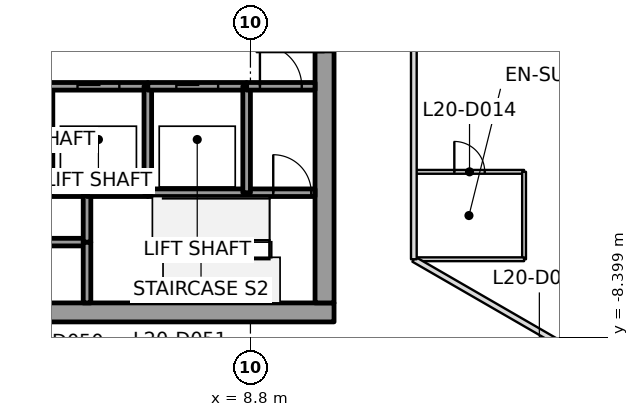
"""IFC4 building model, lengths in metres.
Left out: names, types, materials, properties, quantities, classifications, styles, units other than length and angle.
Written with IfcOpenShell. Run it as: python <this file> out.ifc"""

import sys

from ifc_helpers import new_model, si_unit, direction, frame, frame_2d, origin, place, context, subcontext, project, spatial, rectangle, extrude, element, fill, save


model = new_model("IFC4")
c1 = context("Model", 3, precision=1e-05, world=origin(), true_north=direction((0.0, 1.0)))
c2 = subcontext(c1, "Body", "Model", "MODEL_VIEW")
j1 = project(units=[si_unit("LENGTHUNIT", "METRE"), si_unit("PLANEANGLEUNIT", "RADIAN")], contexts=[c1])
p1 = place(None, origin())
s1 = spatial("IfcSite", under=j1, at=p1, CompositionType="ELEMENT")
p2 = place(p1, origin())
s2 = spatial("IfcBuilding", under=s1, at=p2, CompositionType="ELEMENT")
p3 = place(p2, frame((0.0, 0.0, 96.1)))
s3 = spatial("IfcBuildingStorey", under=s2, at=p3, CompositionType="ELEMENT", Elevation=96.1)
p4 = place(p3, frame((-11.0, -7.75, 0.0), z_axis=(0.0, 0.0, 1.0), x_axis=(1.0, 0.0, 0.0)))
e1 = element("IfcWall", 1, at=p4, inside=s3, PredefinedType="SHEAR", context=c2, shape_type="SweptSolid", body=[
    extrude(rectangle(XDim=22.0, YDim=0.5, at=frame_2d((11.0, 0.0))), origin(), (0.0, 0.0, 1.0), 3.7),
])
p5 = place(p4, frame((10.45, 0.0, 0.0)))
e2 = element("IfcOpeningElement", 2, at=p5, cuts=e1, PredefinedType="OPENING", context=c2, shape_type="SweptSolid", body=[
    extrude(rectangle(XDim=1.1, YDim=2.1, at=frame_2d((0.55, 1.05))), frame((0.0, 0.25, 0.0), z_axis=(0.0, -1.0, 0.0), x_axis=(1.0, 0.0, 0.0)), (0.0, 0.0, 1.0), 0.5),
])
p6 = place(p3, frame((10.75, -7.5, 0.0), z_axis=(0.0, 0.0, 1.0), x_axis=(0.0, 1.0, 0.0)))
e3 = element("IfcWall", 3, at=p6, inside=s3, PredefinedType="SHEAR", context=c2, shape_type="SweptSolid", body=[
    extrude(rectangle(XDim=15.0, YDim=0.5, at=frame_2d((7.5, 0.0))), origin(), (0.0, 0.0, 1.0), 3.7),
])
p7 = place(p6, frame((6.6, 0.0, 0.0)))
e4 = element("IfcOpeningElement", 4, at=p7, cuts=e3, PredefinedType="OPENING", context=c2, shape_type="SweptSolid", body=[
    extrude(rectangle(XDim=1.8, YDim=2.1, at=frame_2d((0.9, 1.05))), frame((0.0, 0.25, 0.0), z_axis=(0.0, -1.0, 0.0), x_axis=(1.0, 0.0, 0.0)), (0.0, 0.0, 1.0), 0.5),
])
p8 = place(p3, frame((4.5, -5.9, 0.0), z_axis=(0.0, 0.0, 1.0), x_axis=(-1.0, 0.0, 0.0)))
e5 = element("IfcWall", 5, at=p8, inside=s3, PredefinedType="SOLIDWALL", context=c2, shape_type="SweptSolid", body=[
    extrude(rectangle(XDim=2.5, YDim=0.2, at=frame_2d((1.25, 0.0))), origin(), (0.0, 0.0, 1.0), 3.55),
])
p9 = place(p3, frame((4.5, -4.6, 0.0), z_axis=(0.0, 0.0, 1.0), x_axis=(-1.0, 0.0, 0.0)))
e6 = element("IfcWall", 6, at=p9, inside=s3, PredefinedType="SOLIDWALL", context=c2, shape_type="SweptSolid", body=[
    extrude(rectangle(XDim=1.0, YDim=0.2, at=frame_2d((0.5, 0.0))), origin(), (0.0, 0.0, 1.0), 3.55),
])
p10 = place(p3, frame((3.5, -1.8, 0.0), z_axis=(0.0, 0.0, 1.0), x_axis=(1.0, 0.0, 0.0)))
e7 = element("IfcWall", 7, at=p10, inside=s3, PredefinedType="SOLIDWALL", context=c2, shape_type="SweptSolid", body=[
    extrude(rectangle(XDim=2.6, YDim=0.2, at=frame_2d((1.3, 0.0))), origin(), (0.0, 0.0, 1.0), 3.55),
])
p11 = place(p10, frame((0.75, 0.0, 0.0)))
e8 = element("IfcOpeningElement", 8, at=p11, cuts=e7, PredefinedType="OPENING", context=c2, shape_type="SweptSolid", body=[
    extrude(rectangle(XDim=1.1, YDim=2.1, at=frame_2d((0.55, 1.05))), frame((0.0, 0.1, 0.0), z_axis=(0.0, -1.0, 0.0), x_axis=(1.0, 0.0, 0.0)), (0.0, 0.0, 1.0), 0.2),
])
p12 = place(p3, frame((4.5, -7.5, 0.0), z_axis=(0.0, 0.0, 1.0), x_axis=(0.0, 1.0, 0.0)))
e9 = element("IfcWall", 9, at=p12, inside=s3, PredefinedType="SOLIDWALL", context=c2, shape_type="SweptSolid", body=[
    extrude(rectangle(XDim=1.6, YDim=0.2, at=frame_2d((0.8, 0.0))), origin(), (0.0, 0.0, 1.0), 3.55),
])
p13 = place(p3, frame((4.5, -5.9, 0.0), z_axis=(0.0, 0.0, 1.0), x_axis=(0.0, 1.0, 0.0)))
e10 = element("IfcWall", 10, at=p13, inside=s3, PredefinedType="SOLIDWALL", context=c2, shape_type="SweptSolid", body=[
    extrude(rectangle(XDim=1.3, YDim=0.2, at=frame_2d((0.65, 0.0))), origin(), (0.0, 0.0, 1.0), 3.55),
])
p14 = place(p3, frame((4.5, -4.6, 0.0), z_axis=(0.0, 0.0, 1.0), x_axis=(1.0, 0.0, 0.0)))
e11 = element("IfcWall", 11, at=p14, inside=s3, PredefinedType="SOLIDWALL", context=c2, shape_type="SweptSolid", body=[
    extrude(rectangle(XDim=1.6, YDim=0.2, at=frame_2d((0.8, 0.0))), origin(), (0.0, 0.0, 1.0), 3.55),
])
p15 = place(p3, frame((6.1, -4.6, 0.0), z_axis=(0.0, 0.0, 1.0), x_axis=(1.0, 0.0, 0.0)))
e12 = element("IfcWall", 12, at=p15, inside=s3, PredefinedType="SOLIDWALL", context=c2, shape_type="SweptSolid", body=[
    extrude(rectangle(XDim=2.6, YDim=0.2, at=frame_2d((1.3, 0.0))), origin(), (0.0, 0.0, 1.0), 3.55),
])
p16 = place(p3, frame((6.1, -4.6, 0.0), z_axis=(0.0, 0.0, 1.0), x_axis=(0.0, 1.0, 0.0)))
e13 = element("IfcWall", 13, at=p16, inside=s3, PredefinedType="SOLIDWALL", context=c2, shape_type="SweptSolid", body=[
    extrude(rectangle(XDim=2.8, YDim=0.2, at=frame_2d((1.4, 0.0))), origin(), (0.0, 0.0, 1.0), 3.55),
])
p17 = place(p3, frame((6.1, -1.8, 0.0), z_axis=(0.0, 0.0, 1.0), x_axis=(1.0, 0.0, 0.0)))
e14 = element("IfcWall", 14, at=p17, inside=s3, PredefinedType="SOLIDWALL", context=c2, shape_type="SweptSolid", body=[
    extrude(rectangle(XDim=2.6, YDim=0.2, at=frame_2d((1.3, 0.0))), origin(), (0.0, 0.0, 1.0), 3.55),
])
p18 = place(p17, frame((0.75, 0.0, 0.0)))
e15 = element("IfcOpeningElement", 15, at=p18, cuts=e14, PredefinedType="OPENING", context=c2, shape_type="SweptSolid", body=[
    extrude(rectangle(XDim=1.1, YDim=2.1, at=frame_2d((0.55, 1.05))), frame((0.0, 0.1, 0.0), z_axis=(0.0, -1.0, 0.0), x_axis=(1.0, 0.0, 0.0)), (0.0, 0.0, 1.0), 0.2),
])
p19 = place(p3, frame((8.7, -4.6, 0.0), z_axis=(0.0, 0.0, 1.0), x_axis=(1.0, 0.0, 0.0)))
e16 = element("IfcWall", 16, at=p19, inside=s3, PredefinedType="SOLIDWALL", context=c2, shape_type="SweptSolid", body=[
    extrude(rectangle(XDim=1.8, YDim=0.2, at=frame_2d((0.9, 0.0))), origin(), (0.0, 0.0, 1.0), 3.55),
])
p20 = place(p19, frame((0.7, 0.0, 0.0)))
e17 = element("IfcOpeningElement", 17, at=p20, cuts=e16, PredefinedType="OPENING", context=c2, shape_type="SweptSolid", body=[
    extrude(rectangle(XDim=1.0, YDim=2.1, at=frame_2d((0.5, 1.05))), frame((0.0, 0.1, 0.0), z_axis=(0.0, -1.0, 0.0), x_axis=(1.0, 0.0, 0.0)), (0.0, 0.0, 1.0), 0.2),
])
p21 = place(p3, frame((8.7, -1.8, 0.0), z_axis=(0.0, 0.0, 1.0), x_axis=(0.0, -1.0, 0.0)))
e18 = element("IfcWall", 18, at=p21, inside=s3, PredefinedType="SOLIDWALL", context=c2, shape_type="SweptSolid", body=[
    extrude(rectangle(XDim=2.8, YDim=0.2, at=frame_2d((1.4, 0.0))), origin(), (0.0, 0.0, 1.0), 3.55),
])
p22 = place(p3, frame((8.7, -1.8, 0.0), z_axis=(0.0, 0.0, 1.0), x_axis=(1.0, 0.0, 0.0)))
e19 = element("IfcWall", 19, at=p22, inside=s3, PredefinedType="SOLIDWALL", context=c2, shape_type="SweptSolid", body=[
    extrude(rectangle(XDim=1.8, YDim=0.2, at=frame_2d((0.9, 0.0))), origin(), (0.0, 0.0, 1.0), 3.55),
])
p23 = place(p22, frame((0.35, 0.0, 0.0)))
e20 = element("IfcOpeningElement", 20, at=p23, cuts=e19, PredefinedType="OPENING", context=c2, shape_type="SweptSolid", body=[
    extrude(rectangle(XDim=1.1, YDim=2.1, at=frame_2d((0.55, 1.05))), frame((0.0, 0.1, 0.0), z_axis=(0.0, -1.0, 0.0), x_axis=(1.0, 0.0, 0.0)), (0.0, 0.0, 1.0), 0.2),
])
p24 = place(p3, frame((16.997, -8.601, 0.0), z_axis=(0.0, 0.0, 1.0), x_axis=(0.460362856216, 0.887730837933, 0.0)))
e21 = element("IfcWall", 21, at=p24, inside=s3, PredefinedType="PARTITIONING", context=c2, shape_type="SweptSolid", body=[
    extrude(rectangle(XDim=14.037, YDim=0.175, at=frame_2d((7.018, 0.0))), origin(), (0.0, 0.0, 1.0), 2.947),
])
p25 = place(p3, frame((23.023, -12.08, 0.0), z_axis=(0.0, 0.0, 1.0), x_axis=(-0.866025210421, 0.500000334915, 0.0)))
e22 = element("IfcWall", 22, at=p25, inside=s3, PredefinedType="PARTITIONING", context=c2, shape_type="SweptSolid", body=[
    extrude(rectangle(XDim=11.458, YDim=0.15, at=frame_2d((5.729, 0.0))), origin(), (0.0, 0.0, 1.0), 2.947),
])
p26 = place(p25, frame((4.139, 0.0, 0.0)))
e23 = element("IfcOpeningElement", 23, at=p26, cuts=e22, PredefinedType="OPENING", context=c2, shape_type="SweptSolid", body=[
    extrude(rectangle(XDim=1.0, YDim=2.1, at=frame_2d((0.5, 1.05))), frame((0.0, 0.075, 0.0), z_axis=(0.0, -1.0, 0.0), x_axis=(1.0, 0.0, 0.0)), (0.0, 0.0, 1.0), 0.15),
])
p27 = place(p3, frame((13.1, -6.351, 0.0), z_axis=(0.0, 0.0, 1.0), x_axis=(0.0, 1.0, 0.0)))
e24 = element("IfcWall", 24, at=p27, inside=s3, PredefinedType="PARTITIONING", context=c2, shape_type="SweptSolid", body=[
    extrude(rectangle(XDim=16.371, YDim=0.15, at=frame_2d((8.186, 0.0))), origin(), (0.0, 0.0, 1.0), 2.947),
])
p28 = place(p27, frame((13.401, 0.0, 0.0)))
e25 = element("IfcOpeningElement", 25, at=p28, cuts=e24, PredefinedType="OPENING", context=c2, shape_type="SweptSolid", body=[
    extrude(rectangle(XDim=1.0, YDim=2.1, at=frame_2d((0.5, 1.05))), frame((0.0, 0.075, 0.0), z_axis=(0.0, -1.0, 0.0), x_axis=(1.0, 0.0, 0.0)), (0.0, 0.0, 1.0), 0.15),
])
p29 = place(p27, frame((6.375, 0.0, 0.0)))
e26 = element("IfcOpeningElement", 26, at=p29, cuts=e24, PredefinedType="OPENING", context=c2, shape_type="SweptSolid", body=[
    extrude(rectangle(XDim=1.0, YDim=2.1, at=frame_2d((0.5, 1.05))), frame((0.0, 0.075, 0.0), z_axis=(0.0, -1.0, 0.0), x_axis=(1.0, 0.0, 0.0)), (0.0, 0.0, 1.0), 0.15),
])
p30 = place(p3, frame((13.13, -4.051, 0.0), z_axis=(0.0, 0.0, 1.0), x_axis=(1.0, 0.0, 0.0)))
e27 = element("IfcWall", 27, at=p30, inside=s3, PredefinedType="PARTITIONING", context=c2, shape_type="SweptSolid", body=[
    extrude(rectangle(XDim=2.87, YDim=0.1, at=frame_2d((1.435, 0.0))), origin(), (0.0, 0.0, 1.0), 2.947),
])
p31 = place(p30, frame((1.035, 0.0, 0.0)))
e28 = element("IfcOpeningElement", 28, at=p31, cuts=e27, PredefinedType="OPENING", context=c2, shape_type="SweptSolid", body=[
    extrude(rectangle(XDim=0.8, YDim=2.1, at=frame_2d((0.4, 1.05))), frame((0.0, 0.05, 0.0), z_axis=(0.0, -1.0, 0.0), x_axis=(1.0, 0.0, 0.0)), (0.0, 0.0, 1.0), 0.1),
])
p32 = place(p3, frame((16.0, -4.051, 0.0), z_axis=(0.0, 0.0, 1.0), x_axis=(0.0, -1.0, 0.0)))
e29 = element("IfcWall", 29, at=p32, inside=s3, PredefinedType="PARTITIONING", context=c2, shape_type="SweptSolid", body=[
    extrude(rectangle(XDim=2.3, YDim=0.1, at=frame_2d((1.15, 0.0))), origin(), (0.0, 0.0, 1.0), 3.15),
])
p33 = place(p3, frame((16.0, -6.351, 0.0), z_axis=(0.0, 0.0, 1.0), x_axis=(-1.0, 0.0, 0.0)))
e30 = element("IfcWall", 30, at=p33, inside=s3, PredefinedType="PARTITIONING", context=c2, shape_type="SweptSolid", body=[
    extrude(rectangle(XDim=2.84, YDim=0.1, at=frame_2d((1.42, 0.0))), origin(), (0.0, 0.0, 1.0), 3.15),
])
p34 = place(p31, origin())
e31 = element("IfcDoor", 31, at=p34, inside=s3, OperationType="SINGLE_SWING_LEFT", PredefinedType="DOOR", context=c2, shape_type="SweptSolid", body=[
    extrude(rectangle(XDim=0.8, YDim=2.1, at=frame_2d((0.4, 1.05))), frame((0.0, 0.025, 0.0), z_axis=(0.0, -1.0, 0.0), x_axis=(1.0, 0.0, 0.0)), (0.0, 0.0, 1.0), 0.05),
])
fill(e28, e31)
p35 = place(p11, origin())
e32 = element("IfcDoor", 32, at=p35, inside=s3, OperationType="SLIDING_TO_LEFT", PredefinedType="DOOR", context=c2, shape_type="SweptSolid", body=[
    extrude(rectangle(XDim=1.1, YDim=2.1, at=frame_2d((0.55, 1.05))), frame((0.0, 0.025, 0.0), z_axis=(0.0, -1.0, 0.0), x_axis=(1.0, 0.0, 0.0)), (0.0, 0.0, 1.0), 0.05),
])
fill(e8, e32)
p36 = place(p18, origin())
e33 = element("IfcDoor", 33, at=p36, inside=s3, OperationType="SLIDING_TO_RIGHT", PredefinedType="DOOR", context=c2, shape_type="SweptSolid", body=[
    extrude(rectangle(XDim=1.1, YDim=2.1, at=frame_2d((0.55, 1.05))), frame((0.0, 0.025, 0.0), z_axis=(0.0, -1.0, 0.0), x_axis=(1.0, 0.0, 0.0)), (0.0, 0.0, 1.0), 0.05),
])
fill(e15, e33)
p37 = place(p23, origin())
e34 = element("IfcDoor", 34, at=p37, inside=s3, OperationType="SINGLE_SWING_RIGHT", PredefinedType="DOOR", context=c2, shape_type="SweptSolid", body=[
    extrude(rectangle(XDim=1.1, YDim=2.1, at=frame_2d((0.55, 1.05))), frame((0.0, 0.025, 0.0), z_axis=(0.0, -1.0, 0.0), x_axis=(1.0, 0.0, 0.0)), (0.0, 0.0, 1.0), 0.05),
])
fill(e20, e34)
p38 = place(p20, origin())
e35 = element("IfcDoor", 35, at=p38, inside=s3, OperationType="SINGLE_SWING_RIGHT", PredefinedType="DOOR", context=c2, shape_type="SweptSolid", body=[
    extrude(rectangle(XDim=1.0, YDim=2.1, at=frame_2d((0.5, 1.05))), frame((0.0, 0.025, 0.0), z_axis=(0.0, -1.0, 0.0), x_axis=(1.0, 0.0, 0.0)), (0.0, 0.0, 1.0), 0.05),
])
fill(e17, e35)
p39 = place(p7, origin())
e36 = element("IfcDoor", 36, at=p39, inside=s3, OperationType="DOUBLE_DOOR_SINGLE_SWING", PredefinedType="DOOR", context=c2, shape_type="SweptSolid", body=[
    extrude(rectangle(XDim=1.8, YDim=2.1, at=frame_2d((0.9, 1.05))), frame((0.0, 0.025, 0.0), z_axis=(0.0, -1.0, 0.0), x_axis=(1.0, 0.0, 0.0)), (0.0, 0.0, 1.0), 0.05),
])
fill(e4, e36)
save(model, sys.argv[1])
